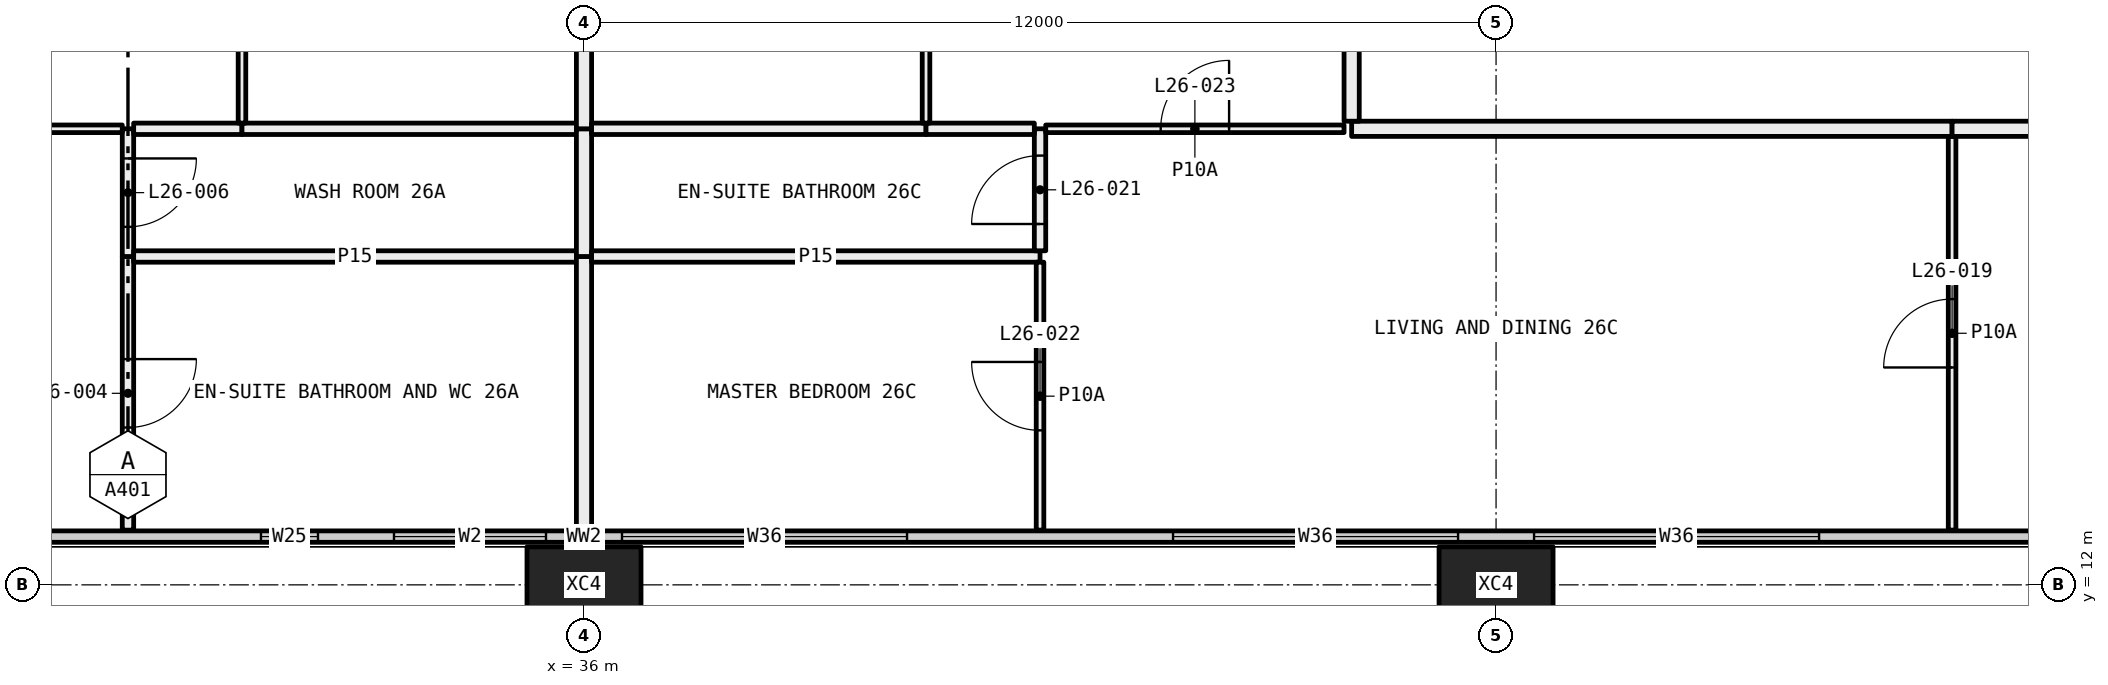
"""IFC4 building model, lengths in metres.
Left out: names, types, materials, properties, quantities, classifications, styles, units other than length and angle.
Written with IfcOpenShell. Run it as: python <this file> out.ifc"""

import sys

from ifc_helpers import new_model, si_unit, direction, frame, frame_2d, origin, origin_2d, place, context, subcontext, project, spatial, rectangle, hollow_rectangle, extrude, element, fill, save


model = new_model("IFC4")
c1 = context("Model", 3, precision=1e-05, world=origin(), true_north=direction((0.0, 1.0)))
c2 = subcontext(c1, "Body", "Model", "MODEL_VIEW")
j1 = project(units=[si_unit("LENGTHUNIT", "METRE"), si_unit("PLANEANGLEUNIT", "RADIAN")], contexts=[c1])
p1 = place(None, origin())
s1 = spatial("IfcSite", under=j1, at=p1, CompositionType="ELEMENT")
p2 = place(p1, origin())
s2 = spatial("IfcBuilding", under=s1, at=p2, CompositionType="ELEMENT")
p3 = place(p2, frame((0.0, 0.0, 103.5)))
s3 = spatial("IfcBuildingStorey", under=s2, at=p3, CompositionType="ELEMENT", Elevation=103.5)
for number, where, z_axis, x_axis in (
    (1, (36.0, 12.0, -0.4), (0.0, 0.0, 1.0), (1.0, 0.0, 0.0)),
    (2, (48.0, 12.0, -0.4), (0.0, 0.0, 1.0), (1.0, 0.0, 0.0)),
):
    element("IfcColumn", number, at=place(p3, frame(where, z_axis=z_axis, x_axis=x_axis)), inside=s3, PredefinedType="COLUMN", context=c2, shape_type="SweptSolid", body=[
        extrude(hollow_rectangle(XDim=1.5, YDim=1.0, WallThickness=0.06, at=origin_2d()), origin(), (0.0, 0.0, 1.0), 3.45),
    ])
p4 = place(p3, frame((6.56, 12.635, 0.0), z_axis=(0.0, 0.0, 1.0), x_axis=(1.0, 0.0, 0.0)))
e3 = element("IfcWall", 3, at=p4, inside=s3, PredefinedType="ELEMENTEDWALL", context=c2, shape_type="SweptSolid", body=[
    extrude(rectangle(XDim=58.88, YDim=0.15, at=frame_2d((29.44, 0.0))), origin(), (0.0, 0.0, 1.0), 3.05),
])
p5 = place(p4, frame((0.44, 0.0, 0.45)))
e4 = element("IfcOpeningElement", 4, at=p5, cuts=e3, PredefinedType="OPENING", context=c2, shape_type="SweptSolid", body=[
    extrude(rectangle(XDim=4.5, YDim=2.55, at=frame_2d((2.25, 1.275))), frame((0.0, 0.085, 0.0), z_axis=(0.0, -1.0, 0.0), x_axis=(1.0, 0.0, 0.0)), (0.0, 0.0, 1.0), 0.17),
])
p6 = place(p4, frame((5.94, 0.0, 0.45)))
e5 = element("IfcOpeningElement", 5, at=p6, cuts=e3, PredefinedType="OPENING", context=c2, shape_type="SweptSolid", body=[
    extrude(rectangle(XDim=3.75, YDim=2.55, at=frame_2d((1.875, 1.275))), frame((0.0, 0.085, 0.0), z_axis=(0.0, -1.0, 0.0), x_axis=(1.0, 0.0, 0.0)), (0.0, 0.0, 1.0), 0.17),
])
p7 = place(p4, frame((13.19, 0.0, 0.45)))
e6 = element("IfcOpeningElement", 6, at=p7, cuts=e3, PredefinedType="OPENING", context=c2, shape_type="SweptSolid", body=[
    extrude(rectangle(XDim=3.75, YDim=2.55, at=frame_2d((1.875, 1.275))), frame((0.0, 0.085, 0.0), z_axis=(0.0, -1.0, 0.0), x_axis=(1.0, 0.0, 0.0)), (0.0, 0.0, 1.0), 0.17),
])
p8 = place(p4, frame((17.94, 0.0, 0.45)))
e7 = element("IfcOpeningElement", 7, at=p8, cuts=e3, PredefinedType="OPENING", context=c2, shape_type="SweptSolid", body=[
    extrude(rectangle(XDim=3.75, YDim=2.55, at=frame_2d((1.875, 1.275))), frame((0.0, 0.085, 0.0), z_axis=(0.0, -1.0, 0.0), x_axis=(1.0, 0.0, 0.0)), (0.0, 0.0, 1.0), 0.17),
])
p9 = place(p4, frame((25.19, 0.0, 0.45)))
e8 = element("IfcOpeningElement", 8, at=p9, cuts=e3, PredefinedType="OPENING", context=c2, shape_type="SweptSolid", body=[
    extrude(rectangle(XDim=0.75, YDim=2.55, at=frame_2d((0.375, 1.275))), frame((0.0, 0.085, 0.0), z_axis=(0.0, -1.0, 0.0), x_axis=(1.0, 0.0, 0.0)), (0.0, 0.0, 1.0), 0.17),
])
p10 = place(p4, frame((26.94, 0.0, 0.45)))
e9 = element("IfcOpeningElement", 9, at=p10, cuts=e3, PredefinedType="OPENING", context=c2, shape_type="SweptSolid", body=[
    extrude(rectangle(XDim=2.0, YDim=2.55, at=frame_2d((1.0, 1.275))), frame((0.0, 0.085, 0.0), z_axis=(0.0, -1.0, 0.0), x_axis=(1.0, 0.0, 0.0)), (0.0, 0.0, 1.0), 0.17),
])
p11 = place(p4, frame((29.94, 0.0, 0.45)))
e10 = element("IfcOpeningElement", 10, at=p11, cuts=e3, PredefinedType="OPENING", context=c2, shape_type="SweptSolid", body=[
    extrude(rectangle(XDim=3.75, YDim=2.55, at=frame_2d((1.875, 1.275))), frame((0.0, 0.085, 0.0), z_axis=(0.0, -1.0, 0.0), x_axis=(1.0, 0.0, 0.0)), (0.0, 0.0, 1.0), 0.17),
])
p12 = place(p4, frame((37.19, 0.0, 0.45)))
e11 = element("IfcOpeningElement", 11, at=p12, cuts=e3, PredefinedType="OPENING", context=c2, shape_type="SweptSolid", body=[
    extrude(rectangle(XDim=3.75, YDim=2.55, at=frame_2d((1.875, 1.275))), frame((0.0, 0.085, 0.0), z_axis=(0.0, -1.0, 0.0), x_axis=(1.0, 0.0, 0.0)), (0.0, 0.0, 1.0), 0.17),
])
p13 = place(p4, frame((41.94, 0.0, 0.45)))
e12 = element("IfcOpeningElement", 12, at=p13, cuts=e3, PredefinedType="OPENING", context=c2, shape_type="SweptSolid", body=[
    extrude(rectangle(XDim=3.75, YDim=2.55, at=frame_2d((1.875, 1.275))), frame((0.0, 0.085, 0.0), z_axis=(0.0, -1.0, 0.0), x_axis=(1.0, 0.0, 0.0)), (0.0, 0.0, 1.0), 0.17),
])
p14 = place(p4, frame((49.19, 0.0, 0.45)))
e13 = element("IfcOpeningElement", 13, at=p14, cuts=e3, PredefinedType="OPENING", context=c2, shape_type="SweptSolid", body=[
    extrude(rectangle(XDim=0.75, YDim=2.55, at=frame_2d((0.375, 1.275))), frame((0.0, 0.085, 0.0), z_axis=(0.0, -1.0, 0.0), x_axis=(1.0, 0.0, 0.0)), (0.0, 0.0, 1.0), 0.17),
])
p15 = place(p4, frame((50.94, 0.0, 0.45)))
e14 = element("IfcOpeningElement", 14, at=p15, cuts=e3, PredefinedType="OPENING", context=c2, shape_type="SweptSolid", body=[
    extrude(rectangle(XDim=2.0, YDim=2.55, at=frame_2d((1.0, 1.275))), frame((0.0, 0.085, 0.0), z_axis=(0.0, -1.0, 0.0), x_axis=(1.0, 0.0, 0.0)), (0.0, 0.0, 1.0), 0.17),
])
p16 = place(p4, frame((53.94, 0.0, 0.45)))
e15 = element("IfcOpeningElement", 15, at=p16, cuts=e3, PredefinedType="OPENING", context=c2, shape_type="SweptSolid", body=[
    extrude(rectangle(XDim=4.5, YDim=2.55, at=frame_2d((2.25, 1.275))), frame((0.0, 0.085, 0.0), z_axis=(0.0, -1.0, 0.0), x_axis=(1.0, 0.0, 0.0)), (0.0, 0.0, 1.0), 0.17),
])
p17 = place(p3, frame((30.0, 12.72, 0.0), z_axis=(0.0, 0.0, 1.0), x_axis=(0.0, 1.0, 0.0)))
e16 = element("IfcWall", 16, at=p17, inside=s3, PredefinedType="PARTITIONING", context=c2, shape_type="SweptSolid", body=[
    extrude(rectangle(XDim=3.6, YDim=0.15, at=frame_2d((1.8, 0.0))), origin(), (0.0, 0.0, 1.0), 3.05),
])
p18 = place(p17, frame((1.35, 0.0, 0.0)))
e17 = element("IfcOpeningElement", 17, at=p18, cuts=e16, PredefinedType="OPENING", context=c2, shape_type="SweptSolid", body=[
    extrude(rectangle(XDim=0.9, YDim=2.1, at=frame_2d((0.45, 1.05))), frame((0.0, 0.085, 0.0), z_axis=(0.0, -1.0, 0.0), x_axis=(1.0, 0.0, 0.0)), (0.0, 0.0, 1.0), 0.17),
])
p19 = place(p3, frame((30.0, 16.32, 0.0), z_axis=(0.0, 0.0, 1.0), x_axis=(0.0, 1.0, 0.0)))
e18 = element("IfcWall", 18, at=p19, inside=s3, PredefinedType="PARTITIONING", context=c2, shape_type="SweptSolid", body=[
    extrude(rectangle(XDim=1.68, YDim=0.15, at=frame_2d((0.84, 0.0))), origin(), (0.0, 0.0, 1.0), 3.05),
])
p20 = place(p19, frame((0.39, 0.0, 0.0)))
e19 = element("IfcOpeningElement", 19, at=p20, cuts=e18, PredefinedType="OPENING", context=c2, shape_type="SweptSolid", body=[
    extrude(rectangle(XDim=0.9, YDim=2.1, at=frame_2d((0.45, 1.05))), frame((0.0, 0.085, 0.0), z_axis=(0.0, -1.0, 0.0), x_axis=(1.0, 0.0, 0.0)), (0.0, 0.0, 1.0), 0.17),
])
p21 = place(p3, frame((29.925, 18.0, 0.0), z_axis=(0.0, 0.0, 1.0), x_axis=(-1.0, 0.0, 0.0)))
e20 = element("IfcWall", 20, at=p21, inside=s3, PredefinedType="PARTITIONING", context=c2, shape_type="SweptSolid", body=[
    extrude(rectangle(XDim=3.925, YDim=0.1, at=frame_2d((1.962, 0.0))), origin(), (0.0, 0.0, 1.0), 3.05),
])
p22 = place(p21, frame((1.512, 0.0, 0.0)))
e21 = element("IfcOpeningElement", 21, at=p22, cuts=e20, PredefinedType="OPENING", context=c2, shape_type="SweptSolid", body=[
    extrude(rectangle(XDim=0.9, YDim=2.1, at=frame_2d((0.45, 1.05))), frame((0.0, 0.06, 0.0), z_axis=(0.0, -1.0, 0.0), x_axis=(1.0, 0.0, 0.0)), (0.0, 0.0, 1.0), 0.12),
])
p23 = place(p3, frame((35.9, 16.32, 0.0), z_axis=(0.0, 0.0, 1.0), x_axis=(-1.0, 0.0, 0.0)))
e22 = element("IfcWall", 22, at=p23, inside=s3, PredefinedType="PARTITIONING", context=c2, shape_type="SweptSolid", body=[
    extrude(rectangle(XDim=5.825, YDim=0.15, at=frame_2d((2.913, 0.0))), origin(), (0.0, 0.0, 1.0), 3.05),
])
p24 = place(p3, frame((36.0, 12.72, 0.0), z_axis=(0.0, 0.0, 1.0), x_axis=(0.0, 1.0, 0.0)))
e23 = element("IfcWall", 23, at=p24, inside=s3, PredefinedType="PARTITIONING", context=c2, shape_type="SweptSolid", body=[
    extrude(rectangle(XDim=3.6, YDim=0.2, at=frame_2d((1.8, 0.0))), origin(), (0.0, 0.0, 1.0), 2.45),
])
p25 = place(p3, frame((31.5, 18.0, 0.0), z_axis=(0.0, 0.0, 1.0), x_axis=(-1.0, 0.0, 0.0)))
e24 = element("IfcWall", 24, at=p25, inside=s3, PredefinedType="PARTITIONING", context=c2, shape_type="SweptSolid", body=[
    extrude(rectangle(XDim=1.425, YDim=0.15, at=frame_2d((0.712, 0.0))), origin(), (0.0, 0.0, 1.0), 3.05),
])
p26 = place(p3, frame((35.9, 18.0, 0.0), z_axis=(0.0, 0.0, 1.0), x_axis=(-1.0, 0.0, 0.0)))
e25 = element("IfcWall", 25, at=p26, inside=s3, PredefinedType="PARTITIONING", context=c2, shape_type="SweptSolid", body=[
    extrude(rectangle(XDim=4.4, YDim=0.15, at=frame_2d((2.2, 0.0))), origin(), (0.0, 0.0, 1.0), 3.05),
])
p27 = place(p3, frame((36.0, 16.32, 0.0), z_axis=(0.0, 0.0, 1.0), x_axis=(0.0, 1.0, 0.0)))
e26 = element("IfcWall", 26, at=p27, inside=s3, PredefinedType="PARTITIONING", context=c2, shape_type="SweptSolid", body=[
    extrude(rectangle(XDim=1.68, YDim=0.2, at=frame_2d((0.84, 0.0))), origin(), (0.0, 0.0, 1.0), 2.45),
])
p28 = place(p3, frame((31.5, 18.075, 0.0), z_axis=(0.0, 0.0, 1.0), x_axis=(0.0, 1.0, 0.0)))
e27 = element("IfcWall", 27, at=p28, inside=s3, PredefinedType="PARTITIONING", context=c2, shape_type="SweptSolid", body=[
    extrude(rectangle(XDim=6.225, YDim=0.1, at=frame_2d((3.113, 0.0))), origin(), (0.0, 0.0, 1.0), 2.45),
])
p29 = place(p28, frame((2.663, 0.0, 0.0)))
e28 = element("IfcOpeningElement", 28, at=p29, cuts=e27, PredefinedType="OPENING", context=c2, shape_type="SweptSolid", body=[
    extrude(rectangle(XDim=0.9, YDim=2.1, at=frame_2d((0.45, 1.05))), frame((0.0, 0.06, 0.0), z_axis=(0.0, -1.0, 0.0), x_axis=(1.0, 0.0, 0.0)), (0.0, 0.0, 1.0), 0.12),
])
p30 = place(p3, frame((36.0, 18.0, 0.0), z_axis=(0.0, 0.0, 1.0), x_axis=(0.0, 1.0, 0.0)))
e29 = element("IfcWall", 29, at=p30, inside=s3, PredefinedType="PARTITIONING", context=c2, shape_type="SweptSolid", body=[
    extrude(rectangle(XDim=5.25, YDim=0.2, at=frame_2d((2.625, 0.0))), origin(), (0.0, 0.0, 1.0), 2.45),
])
p31 = place(p3, frame((42.0, 16.32, 0.0), z_axis=(0.0, 0.0, 1.0), x_axis=(-1.0, 0.0, 0.0)))
e30 = element("IfcWall", 30, at=p31, inside=s3, PredefinedType="PARTITIONING", context=c2, shape_type="SweptSolid", body=[
    extrude(rectangle(XDim=5.9, YDim=0.15, at=frame_2d((2.95, 0.0))), origin(), (0.0, 0.0, 1.0), 3.05),
])
p32 = place(p3, frame((42.0, 12.72, 0.0), z_axis=(0.0, 0.0, 1.0), x_axis=(0.0, 1.0, 0.0)))
e31 = element("IfcWall", 31, at=p32, inside=s3, PredefinedType="PARTITIONING", context=c2, shape_type="SweptSolid", body=[
    extrude(rectangle(XDim=3.525, YDim=0.1, at=frame_2d((1.763, 0.0))), origin(), (0.0, 0.0, 1.0), 3.05),
])
p33 = place(p32, frame((1.312, 0.0, 0.0)))
e32 = element("IfcOpeningElement", 32, at=p33, cuts=e31, PredefinedType="OPENING", context=c2, shape_type="SweptSolid", body=[
    extrude(rectangle(XDim=0.9, YDim=2.1, at=frame_2d((0.45, 1.05))), frame((0.0, 0.06, 0.0), z_axis=(0.0, -1.0, 0.0), x_axis=(1.0, 0.0, 0.0)), (0.0, 0.0, 1.0), 0.12),
])
p34 = place(p3, frame((42.0, 16.395, 0.0), z_axis=(0.0, 0.0, 1.0), x_axis=(0.0, 1.0, 0.0)))
e33 = element("IfcWall", 33, at=p34, inside=s3, PredefinedType="PARTITIONING", context=c2, shape_type="SweptSolid", body=[
    extrude(rectangle(XDim=1.605, YDim=0.15, at=frame_2d((0.802, 0.0))), origin(), (0.0, 0.0, 1.0), 3.05),
])
p35 = place(p34, frame((0.353, 0.0, 0.0)))
e34 = element("IfcOpeningElement", 34, at=p35, cuts=e33, PredefinedType="OPENING", context=c2, shape_type="SweptSolid", body=[
    extrude(rectangle(XDim=0.9, YDim=2.1, at=frame_2d((0.45, 1.05))), frame((0.0, 0.085, 0.0), z_axis=(0.0, -1.0, 0.0), x_axis=(1.0, 0.0, 0.0)), (0.0, 0.0, 1.0), 0.17),
])
p36 = place(p3, frame((40.5, 18.0, 0.0), z_axis=(0.0, 0.0, 1.0), x_axis=(-1.0, 0.0, 0.0)))
e35 = element("IfcWall", 35, at=p36, inside=s3, PredefinedType="PARTITIONING", context=c2, shape_type="SweptSolid", body=[
    extrude(rectangle(XDim=4.4, YDim=0.15, at=frame_2d((2.2, 0.0))), origin(), (0.0, 0.0, 1.0), 3.05),
])
p37 = place(p3, frame((41.925, 18.0, 0.0), z_axis=(0.0, 0.0, 1.0), x_axis=(-1.0, 0.0, 0.0)))
e36 = element("IfcWall", 36, at=p37, inside=s3, PredefinedType="PARTITIONING", context=c2, shape_type="SweptSolid", body=[
    extrude(rectangle(XDim=1.425, YDim=0.15, at=frame_2d((0.712, 0.0))), origin(), (0.0, 0.0, 1.0), 3.05),
])
p38 = place(p3, frame((54.0, 12.72, 0.0), z_axis=(0.0, 0.0, 1.0), x_axis=(0.0, 1.0, 0.0)))
e37 = element("IfcWall", 37, at=p38, inside=s3, PredefinedType="PARTITIONING", context=c2, shape_type="SweptSolid", body=[
    extrude(rectangle(XDim=5.18, YDim=0.1, at=frame_2d((2.59, 0.0))), origin(), (0.0, 0.0, 1.0), 3.05),
])
p39 = place(p38, frame((2.14, 0.0, 0.0)))
e38 = element("IfcOpeningElement", 38, at=p39, cuts=e37, PredefinedType="OPENING", context=c2, shape_type="SweptSolid", body=[
    extrude(rectangle(XDim=0.9, YDim=2.1, at=frame_2d((0.45, 1.05))), frame((0.0, 0.06, 0.0), z_axis=(0.0, -1.0, 0.0), x_axis=(1.0, 0.0, 0.0)), (0.0, 0.0, 1.0), 0.12),
])
p40 = place(p3, frame((46.0, 18.0, 0.0), z_axis=(0.0, 0.0, 1.0), x_axis=(-1.0, 0.0, 0.0)))
e39 = element("IfcWall", 39, at=p40, inside=s3, PredefinedType="PARTITIONING", context=c2, shape_type="SweptSolid", body=[
    extrude(rectangle(XDim=3.925, YDim=0.1, at=frame_2d((1.962, 0.0))), origin(), (0.0, 0.0, 1.0), 3.05),
])
p41 = place(p40, frame((1.512, 0.0, 0.0)))
e40 = element("IfcOpeningElement", 40, at=p41, cuts=e39, PredefinedType="OPENING", context=c2, shape_type="SweptSolid", body=[
    extrude(rectangle(XDim=0.9, YDim=2.1, at=frame_2d((0.45, 1.05))), frame((0.0, 0.06, 0.0), z_axis=(0.0, -1.0, 0.0), x_axis=(1.0, 0.0, 0.0)), (0.0, 0.0, 1.0), 0.12),
])
p42 = place(p3, frame((54.0, 18.0, 0.0), z_axis=(0.0, 0.0, 1.0), x_axis=(-1.0, 0.0, 0.0)))
e41 = element("IfcWall", 41, at=p42, inside=s3, PredefinedType="PARTITIONING", context=c2, shape_type="SweptSolid", body=[
    extrude(rectangle(XDim=7.9, YDim=0.2, at=frame_2d((3.95, 0.0))), origin(), (0.0, 0.0, 1.0), 3.05),
])
p43 = place(p3, frame((60.0, 18.0, 0.0), z_axis=(0.0, 0.0, 1.0), x_axis=(-1.0, 0.0, 0.0)))
e42 = element("IfcWall", 42, at=p43, inside=s3, PredefinedType="PARTITIONING", context=c2, shape_type="SweptSolid", body=[
    extrude(rectangle(XDim=6.0, YDim=0.2, at=frame_2d((3.0, 0.0))), origin(), (0.0, 0.0, 1.0), 3.05),
])
p44 = place(p43, frame((2.5, 0.0, 0.0)))
e43 = element("IfcOpeningElement", 43, at=p44, cuts=e42, PredefinedType="OPENING", context=c2, shape_type="SweptSolid", body=[
    extrude(rectangle(XDim=1.0, YDim=2.1, at=frame_2d((0.5, 1.05))), frame((0.0, 0.11, 0.0), z_axis=(0.0, -1.0, 0.0), x_axis=(1.0, 0.0, 0.0)), (0.0, 0.0, 1.0), 0.22),
])
p45 = place(p3, frame((40.5, 18.075, 0.0), z_axis=(0.0, 0.0, 1.0), x_axis=(0.0, 1.0, 0.0)))
e44 = element("IfcWall", 44, at=p45, inside=s3, PredefinedType="PARTITIONING", context=c2, shape_type="SweptSolid", body=[
    extrude(rectangle(XDim=6.15, YDim=0.1, at=frame_2d((3.075, 0.0))), origin(), (0.0, 0.0, 1.0), 2.45),
])
p46 = place(p45, frame((2.625, 0.0, 0.0)))
e45 = element("IfcOpeningElement", 45, at=p46, cuts=e44, PredefinedType="OPENING", context=c2, shape_type="SweptSolid", body=[
    extrude(rectangle(XDim=0.9, YDim=2.1, at=frame_2d((0.45, 1.05))), frame((0.0, 0.06, 0.0), z_axis=(0.0, -1.0, 0.0), x_axis=(1.0, 0.0, 0.0)), (0.0, 0.0, 1.0), 0.12),
])
p47 = place(p3, frame((46.1, 18.1, 0.0), z_axis=(0.0, 0.0, 1.0), x_axis=(0.0, 1.0, 0.0)))
e46 = element("IfcWall", 46, at=p47, inside=s3, PredefinedType="PARTITIONING", context=c2, shape_type="SweptSolid", body=[
    extrude(rectangle(XDim=6.2, YDim=0.2, at=frame_2d((3.1, 0.0))), origin(), (0.0, 0.0, 1.0), 2.45),
])
p48 = place(p9, origin())
e47 = element("IfcWindow", 47, at=p48, inside=s3, PartitioningType="SINGLE_PANEL", PredefinedType="WINDOW", context=c2, shape_type="SweptSolid", body=[
    extrude(rectangle(XDim=0.75, YDim=2.55, at=frame_2d((0.375, 1.275))), frame((0.0, 0.03, 0.0), z_axis=(0.0, -1.0, 0.0), x_axis=(1.0, 0.0, 0.0)), (0.0, 0.0, 1.0), 0.06),
])
fill(e8, e47)
p49 = place(p10, origin())
e48 = element("IfcWindow", 48, at=p49, inside=s3, PartitioningType="SINGLE_PANEL", PredefinedType="WINDOW", context=c2, shape_type="SweptSolid", body=[
    extrude(rectangle(XDim=2.0, YDim=2.55, at=frame_2d((1.0, 1.275))), frame((0.0, 0.03, 0.0), z_axis=(0.0, -1.0, 0.0), x_axis=(1.0, 0.0, 0.0)), (0.0, 0.0, 1.0), 0.06),
])
fill(e9, e48)
p50 = place(p11, origin())
e49 = element("IfcWindow", 49, at=p50, inside=s3, PartitioningType="SINGLE_PANEL", PredefinedType="WINDOW", context=c2, shape_type="SweptSolid", body=[
    extrude(rectangle(XDim=3.75, YDim=2.55, at=frame_2d((1.875, 1.275))), frame((0.0, 0.03, 0.0), z_axis=(0.0, -1.0, 0.0), x_axis=(1.0, 0.0, 0.0)), (0.0, 0.0, 1.0), 0.06),
])
fill(e10, e49)
p51 = place(p12, origin())
e50 = element("IfcWindow", 50, at=p51, inside=s3, PartitioningType="SINGLE_PANEL", PredefinedType="WINDOW", context=c2, shape_type="SweptSolid", body=[
    extrude(rectangle(XDim=3.75, YDim=2.55, at=frame_2d((1.875, 1.275))), frame((0.0, 0.03, 0.0), z_axis=(0.0, -1.0, 0.0), x_axis=(1.0, 0.0, 0.0)), (0.0, 0.0, 1.0), 0.06),
])
fill(e11, e50)
p52 = place(p13, origin())
e51 = element("IfcWindow", 51, at=p52, inside=s3, PartitioningType="SINGLE_PANEL", PredefinedType="WINDOW", context=c2, shape_type="SweptSolid", body=[
    extrude(rectangle(XDim=3.75, YDim=2.55, at=frame_2d((1.875, 1.275))), frame((0.0, 0.03, 0.0), z_axis=(0.0, -1.0, 0.0), x_axis=(1.0, 0.0, 0.0)), (0.0, 0.0, 1.0), 0.06),
])
fill(e12, e51)
p53 = place(p18, frame((0.9, 0.0, 0.0), x_axis=(-1.0, 0.0, 0.0)))
e52 = element("IfcDoor", 52, at=p53, inside=s3, OperationType="SINGLE_SWING_RIGHT", PredefinedType="DOOR", context=c2, shape_type="SweptSolid", body=[
    extrude(rectangle(XDim=0.9, YDim=2.1, at=frame_2d((0.45, 1.05))), frame((0.0, 0.025, 0.0), z_axis=(0.0, -1.0, 0.0), x_axis=(1.0, 0.0, 0.0)), (0.0, 0.0, 1.0), 0.05),
])
fill(e17, e52)
p54 = place(p20, frame((0.9, 0.0, 0.0), x_axis=(-1.0, 0.0, 0.0)))
e53 = element("IfcDoor", 53, at=p54, inside=s3, OperationType="SINGLE_SWING_RIGHT", PredefinedType="DOOR", context=c2, shape_type="SweptSolid", body=[
    extrude(rectangle(XDim=0.9, YDim=2.1, at=frame_2d((0.45, 1.05))), frame((0.0, 0.025, 0.0), z_axis=(0.0, -1.0, 0.0), x_axis=(1.0, 0.0, 0.0)), (0.0, 0.0, 1.0), 0.05),
])
fill(e19, e53)
p55 = place(p39, origin())
e54 = element("IfcDoor", 54, at=p55, inside=s3, OperationType="SINGLE_SWING_RIGHT", PredefinedType="DOOR", context=c2, shape_type="SweptSolid", body=[
    extrude(rectangle(XDim=0.9, YDim=2.1, at=frame_2d((0.45, 1.05))), frame((0.0, 0.025, 0.0), z_axis=(0.0, -1.0, 0.0), x_axis=(1.0, 0.0, 0.0)), (0.0, 0.0, 1.0), 0.05),
])
fill(e38, e54)
p56 = place(p35, origin())
e55 = element("IfcDoor", 55, at=p56, inside=s3, OperationType="SINGLE_SWING_RIGHT", PredefinedType="DOOR", context=c2, shape_type="SweptSolid", body=[
    extrude(rectangle(XDim=0.9, YDim=2.1, at=frame_2d((0.45, 1.05))), frame((0.0, 0.025, 0.0), z_axis=(0.0, -1.0, 0.0), x_axis=(1.0, 0.0, 0.0)), (0.0, 0.0, 1.0), 0.05),
])
fill(e34, e55)
p57 = place(p33, origin())
e56 = element("IfcDoor", 56, at=p57, inside=s3, OperationType="SINGLE_SWING_LEFT", PredefinedType="DOOR", context=c2, shape_type="SweptSolid", body=[
    extrude(rectangle(XDim=0.9, YDim=2.1, at=frame_2d((0.45, 1.05))), frame((0.0, 0.025, 0.0), z_axis=(0.0, -1.0, 0.0), x_axis=(1.0, 0.0, 0.0)), (0.0, 0.0, 1.0), 0.05),
])
fill(e32, e56)
p58 = place(p41, frame((0.9, 0.0, 0.0), x_axis=(-1.0, 0.0, 0.0)))
e57 = element("IfcDoor", 57, at=p58, inside=s3, OperationType="SINGLE_SWING_LEFT", PredefinedType="DOOR", context=c2, shape_type="SweptSolid", body=[
    extrude(rectangle(XDim=0.9, YDim=2.1, at=frame_2d((0.45, 1.05))), frame((0.0, 0.025, 0.0), z_axis=(0.0, -1.0, 0.0), x_axis=(1.0, 0.0, 0.0)), (0.0, 0.0, 1.0), 0.05),
])
fill(e40, e57)
save(model, sys.argv[1])
